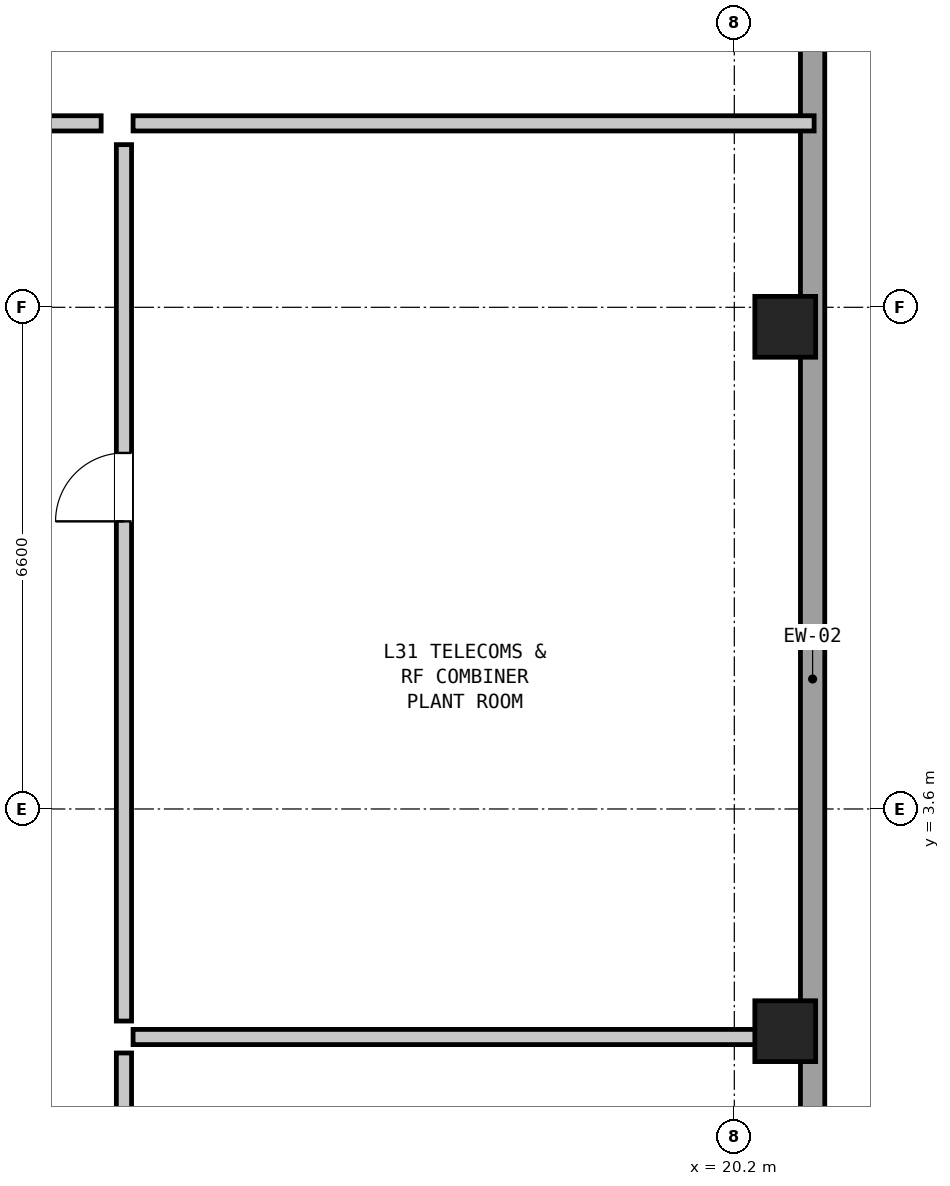
"""IFC4 building model, lengths in metres.
Left out: names, types, materials, properties, quantities, classifications, styles, units other than length and angle.
Written with IfcOpenShell. Run it as: python <this file> out.ifc"""

import sys

from ifc_helpers import new_model, si_unit, direction, frame, frame_2d, origin, origin_2d, place, context, subcontext, project, spatial, rectangle, hollow_rectangle, extrude, element, fill, save


model = new_model("IFC4")
c1 = context("Model", 3, precision=1e-05, world=origin(), true_north=direction((0.0, 1.0)))
c2 = subcontext(c1, "Body", "Model", "MODEL_VIEW")
j1 = project(units=[si_unit("LENGTHUNIT", "METRE"), si_unit("PLANEANGLEUNIT", "RADIAN")], contexts=[c1])
p1 = place(None, origin())
s1 = spatial("IfcSite", under=j1, at=p1, CompositionType="ELEMENT")
p2 = place(p1, origin())
s2 = spatial("IfcBuilding", under=s1, at=p2, CompositionType="ELEMENT")
p3 = place(p2, frame((0.0, 0.0, 108.45)))
s3 = spatial("IfcBuildingStorey", under=s2, at=p3, CompositionType="ELEMENT", Elevation=108.45)
for number, where, z_axis, x_axis in (
    (1, (20.87, 0.677, 0.0), (0.0, 0.0, 1.0), (0.0, 1.0, 0.0)),
    (2, (20.87, 9.943, 0.0), (0.0, 0.0, 1.0), (0.0, 1.0, 0.0)),
):
    element("IfcColumn", number, at=place(p3, frame(where, z_axis=z_axis, x_axis=x_axis)), inside=s3, PredefinedType="COLUMN", context=c2, shape_type="SweptSolid", body=[
        extrude(hollow_rectangle(XDim=0.8, YDim=0.8, WallThickness=0.05, at=origin_2d()), origin(), (0.0, 0.0, 1.0), 4.35),
    ])
p4 = place(p3, frame((21.23, 18.822, 0.0), z_axis=(0.0, 0.0, 1.0), x_axis=(0.0, -1.0, 0.0)))
e3 = element("IfcWall", 3, at=p4, inside=s3, PredefinedType="SOLIDWALL", context=c2, shape_type="SweptSolid", body=[
    extrude(rectangle(XDim=27.024, YDim=0.32, at=frame_2d((13.512, 0.0))), origin(), (0.0, 0.0, 1.0), 2.31),
])
p5 = place(p3, frame((5.98, 12.62, 0.0), z_axis=(0.0, 0.0, 1.0), x_axis=(1.0, 0.0, 0.0)))
e4 = element("IfcWall", 4, at=p5, inside=s3, PredefinedType="PARTITIONING", context=c2, shape_type="SweptSolid", body=[
    extrude(rectangle(XDim=5.89, YDim=0.2, at=frame_2d((2.945, 0.0))), origin(), (0.0, 0.0, 1.0), 4.13),
])
p6 = place(p5, frame((2.37, 0.0, 0.0)))
e5 = element("IfcOpeningElement", 5, at=p6, cuts=e4, PredefinedType="OPENING", context=c2, shape_type="SweptSolid", body=[
    extrude(rectangle(XDim=1.15, YDim=2.1, at=frame_2d((0.575, 1.05))), frame((0.0, 0.112, 0.0), z_axis=(0.0, -1.0, 0.0), x_axis=(1.0, 0.0, 0.0)), (0.0, 0.0, 1.0), 0.224),
])
p7 = place(p3, frame((12.29, 12.62, 0.0), z_axis=(0.0, 0.0, 1.0), x_axis=(1.0, 0.0, 0.0)))
e6 = element("IfcWall", 6, at=p7, inside=s3, PredefinedType="PARTITIONING", context=c2, shape_type="SweptSolid", body=[
    extrude(rectangle(XDim=8.96, YDim=0.2, at=frame_2d((4.48, 0.0))), origin(), (0.0, 0.0, 1.0), 4.13),
])
p8 = place(p3, frame((12.29, 0.6, 0.0), z_axis=(0.0, 0.0, 1.0), x_axis=(1.0, 0.0, 0.0)))
e7 = element("IfcWall", 7, at=p8, inside=s3, PredefinedType="PARTITIONING", context=c2, shape_type="SweptSolid", body=[
    extrude(rectangle(XDim=8.96, YDim=0.2, at=frame_2d((4.48, 0.0))), origin(), (0.0, 0.0, 1.0), 2.31),
])
p9 = place(p3, frame((12.17, -11.14, 0.0), z_axis=(0.0, 0.0, 1.0), x_axis=(0.0, 1.0, 0.0)))
e8 = element("IfcWall", 8, at=p9, inside=s3, PredefinedType="PARTITIONING", context=c2, shape_type="SweptSolid", body=[
    extrude(rectangle(XDim=11.53, YDim=0.2, at=frame_2d((5.765, 0.0))), origin(), (0.0, 0.0, 1.0), 4.13),
])
p10 = place(p9, frame((5.19, 0.0, 0.0)))
e9 = element("IfcOpeningElement", 9, at=p10, cuts=e8, PredefinedType="OPENING", context=c2, shape_type="SweptSolid", body=[
    extrude(rectangle(XDim=1.15, YDim=2.1, at=frame_2d((0.575, 1.05))), frame((0.0, 0.112, 0.0), z_axis=(0.0, -1.0, 0.0), x_axis=(1.0, 0.0, 0.0)), (0.0, 0.0, 1.0), 0.224),
])
p11 = place(p3, frame((12.17, 0.81, 0.0), z_axis=(0.0, 0.0, 1.0), x_axis=(0.0, 1.0, 0.0)))
e10 = element("IfcWall", 10, at=p11, inside=s3, PredefinedType="PARTITIONING", context=c2, shape_type="SweptSolid", body=[
    extrude(rectangle(XDim=11.53, YDim=0.2, at=frame_2d((5.765, 0.0))), origin(), (0.0, 0.0, 1.0), 2.11),
])
p12 = place(p11, frame((6.574, 0.0, 0.0)))
e11 = element("IfcOpeningElement", 11, at=p12, cuts=e10, PredefinedType="OPENING", context=c2, shape_type="SweptSolid", body=[
    extrude(rectangle(XDim=0.9, YDim=2.05, at=frame_2d((0.45, 1.025))), frame((0.0, 0.112, 0.0), z_axis=(0.0, -1.0, 0.0), x_axis=(1.0, 0.0, 0.0)), (0.0, 0.0, 1.0), 0.224),
])
p13 = place(p12, origin())
e12 = element("IfcDoor", 12, at=p13, inside=s3, OperationType="SINGLE_SWING_LEFT", PredefinedType="DOOR", context=c2, shape_type="SweptSolid", body=[
    extrude(rectangle(XDim=0.9, YDim=2.05, at=frame_2d((0.45, 1.025))), frame((0.0, 0.025, 0.0), z_axis=(0.0, -1.0, 0.0), x_axis=(1.0, 0.0, 0.0)), (0.0, 0.0, 1.0), 0.05),
])
fill(e11, e12)
save(model, sys.argv[1])
